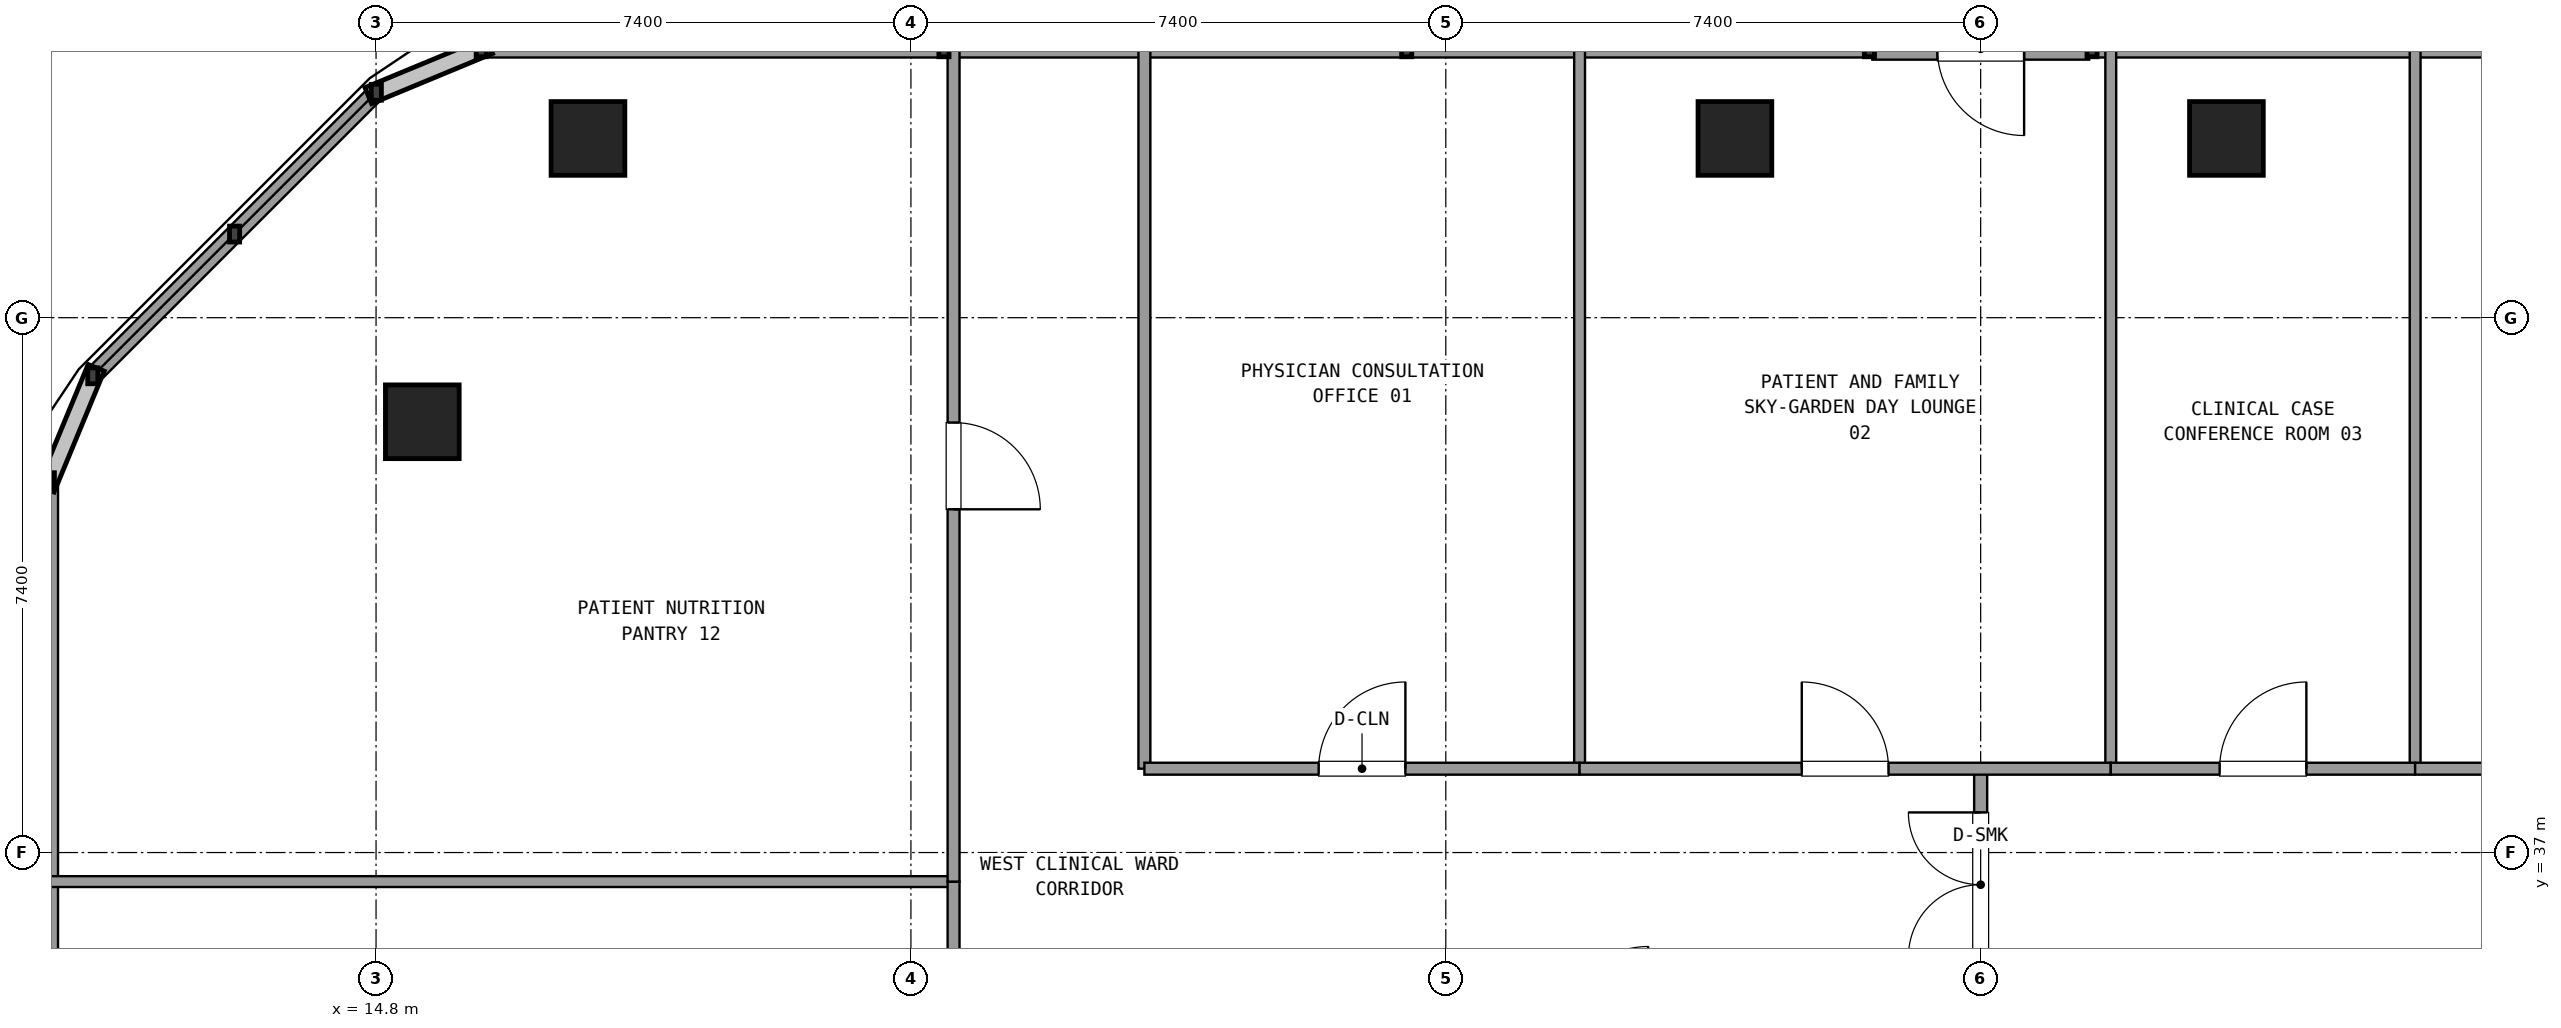
"""IFC4 building model, lengths in metres.
Left out: names, types, materials, properties, quantities, classifications, styles, units other than length and angle.
Written with IfcOpenShell. Run it as: python <this file> out.ifc"""

import sys

from ifc_helpers import new_model, si_unit, direction, frame, frame_2d, origin, origin_2d, place, context, subcontext, project, spatial, rectangle, extrude, element, fill, save


model = new_model("IFC4")
c1 = context("Model", 3, precision=1e-05, world=origin(), true_north=direction((0.0, 1.0)))
c2 = subcontext(c1, "Body", "Model", "MODEL_VIEW")
j1 = project(units=[si_unit("LENGTHUNIT", "METRE"), si_unit("PLANEANGLEUNIT", "RADIAN")], contexts=[c1])
p1 = place(None, origin())
s1 = spatial("IfcSite", under=j1, at=p1, CompositionType="ELEMENT")
p2 = place(p1, origin())
s2 = spatial("IfcBuilding", under=s1, at=p2, CompositionType="ELEMENT")
p3 = place(p2, frame((0.0, 0.0, 81.18)))
s3 = spatial("IfcBuildingStorey", under=s2, at=p3, CompositionType="ELEMENT", Elevation=81.18)
for number, where, z_axis, x_axis in (
    (1, (40.4, 46.88, 0.0), (0.0, 0.0, 1.0), (1.0, 0.0, 0.0)),
    (2, (33.6, 46.88, 0.0), (0.0, 0.0, 1.0), (1.0, 0.0, 0.0)),
    (3, (17.732, 46.88, 0.0), (0.0, 0.0, 1.0), (1.0, 0.0, 0.0)),
    (4, (15.44, 42.96, 0.0), (0.0, 0.0, 1.0), (1.0, 0.0, 0.0)),
):
    element("IfcColumn", number, at=place(p3, frame(where, z_axis=z_axis, x_axis=x_axis)), inside=s3, PredefinedType="COLUMN", context=c2, shape_type="SweptSolid", body=[
        extrude(rectangle(XDim=1.02, YDim=1.02, at=origin_2d()), origin(), (0.0, 0.0, 1.0), 3.6),
    ])
p4 = place(p3, frame((38.501, 48.12, 0.0), z_axis=(0.0, 0.0, 1.0), x_axis=(-1.0, 0.0, 0.0)))
e5 = element("IfcWall", 5, at=p4, inside=s3, PredefinedType="SOLIDWALL", context=c2, shape_type="SweptSolid", body=[
    extrude(rectangle(XDim=3.0, YDim=0.3, at=frame_2d((1.5, 0.0))), origin(), (0.0, 0.0, 1.0), 2.67),
])
p5 = place(p4, frame((0.9, 0.0, 0.0)))
e6 = element("IfcOpeningElement", 6, at=p5, cuts=e5, PredefinedType="OPENING", context=c2, shape_type="SweptSolid", body=[
    extrude(rectangle(XDim=1.2, YDim=2.2, at=frame_2d((0.6, 1.1))), frame((0.0, 0.16, 0.0), z_axis=(0.0, -1.0, 0.0), x_axis=(1.0, 0.0, 0.0)), (0.0, 0.0, 1.0), 0.32),
])
p6 = place(p3, frame((57.745, 48.12, 0.0), z_axis=(0.0, 0.0, 1.0), x_axis=(-1.0, 0.0, 0.0)))
e7 = element("IfcWall", 7, at=p6, inside=s3, PredefinedType="SOLIDWALL", context=c2, shape_type="SweptSolid", body=[
    extrude(rectangle(XDim=19.204, YDim=0.24, at=frame_2d((9.602, 0.0))), origin(), (0.0, 0.0, 1.0), 0.85),
])
p7 = place(p3, frame((35.461, 48.12, 0.0), z_axis=(0.0, 0.0, 1.0), x_axis=(-1.0, 0.0, 0.0)))
e8 = element("IfcWall", 8, at=p7, inside=s3, PredefinedType="SOLIDWALL", context=c2, shape_type="SweptSolid", body=[
    extrude(rectangle(XDim=19.206, YDim=0.24, at=frame_2d((9.603, 0.0))), origin(), (0.0, 0.0, 1.0), 0.85),
])
p8 = place(p3, frame((14.804, 47.519, 0.0), z_axis=(0.0, 0.0, 1.0), x_axis=(-0.707084777957, -0.707128783731, 0.0)))
e9 = element("IfcWall", 9, at=p8, inside=s3, PredefinedType="SOLIDWALL", context=c2, shape_type="SweptSolid", body=[
    extrude(rectangle(XDim=5.548, YDim=0.24, at=frame_2d((2.774, 0.0))), origin(), (0.0, 0.0, 1.0), 0.85),
])
p9 = place(p3, frame((10.28, 42.145, 0.0), z_axis=(0.0, 0.0, 1.0), x_axis=(0.0, -1.0, 0.0)))
e10 = element("IfcWall", 10, at=p9, inside=s3, PredefinedType="SOLIDWALL", context=c2, shape_type="SweptSolid", body=[
    extrude(rectangle(XDim=32.49, YDim=0.24, at=frame_2d((16.245, 0.0))), origin(), (0.0, 0.0, 1.0), 0.85),
])
p10 = place(p3, frame((37.0, 34.95, 0.0), z_axis=(0.0, 0.0, 1.0), x_axis=(0.0, 1.0, 0.0)))
e11 = element("IfcWall", 11, at=p10, inside=s3, PredefinedType="PARTITIONING", context=c2, shape_type="SweptSolid", body=[
    extrude(rectangle(XDim=3.21, YDim=0.18, at=frame_2d((1.605, 0.0))), origin(), (0.0, 0.0, 1.0), 2.61),
])
p11 = place(p10, frame((0.605, 0.0, 0.0)))
e12 = element("IfcOpeningElement", 12, at=p11, cuts=e11, PredefinedType="OPENING", context=c2, shape_type="SweptSolid", body=[
    extrude(rectangle(XDim=2.0, YDim=2.2, at=frame_2d((1.0, 1.1))), frame((0.0, 0.1, 0.0), z_axis=(0.0, -1.0, 0.0), x_axis=(1.0, 0.0, 0.0)), (0.0, 0.0, 1.0), 0.2),
])
p12 = place(p3, frame((25.43, 38.16, 0.0), z_axis=(0.0, 0.0, 1.0), x_axis=(0.0, 1.0, 0.0)))
e13 = element("IfcWall", 13, at=p12, inside=s3, PredefinedType="PARTITIONING", context=c2, shape_type="SweptSolid", body=[
    extrude(rectangle(XDim=9.94, YDim=0.165, at=frame_2d((4.97, 0.0))), origin(), (0.0, 0.0, 1.0), 2.61),
])
p13 = place(p3, frame((31.451, 38.16, 0.0), z_axis=(0.0, 0.0, 1.0), x_axis=(0.0, 1.0, 0.0)))
e14 = element("IfcWall", 14, at=p13, inside=s3, PredefinedType="PARTITIONING", context=c2, shape_type="SweptSolid", body=[
    extrude(rectangle(XDim=9.94, YDim=0.15, at=frame_2d((4.97, 0.0))), origin(), (0.0, 0.0, 1.0), 2.61),
])
p14 = place(p3, frame((25.43, 38.16, 0.0), z_axis=(0.0, 0.0, 1.0), x_axis=(1.0, 0.0, 0.0)))
e15 = element("IfcWall", 15, at=p14, inside=s3, PredefinedType="PARTITIONING", context=c2, shape_type="SweptSolid", body=[
    extrude(rectangle(XDim=6.021, YDim=0.165, at=frame_2d((3.01, 0.0))), origin(), (0.0, 0.0, 1.0), 2.61),
])
p15 = place(p14, frame((2.411, 0.0, 0.0)))
e16 = element("IfcOpeningElement", 16, at=p15, cuts=e15, PredefinedType="OPENING", context=c2, shape_type="SweptSolid", body=[
    extrude(rectangle(XDim=1.2, YDim=2.15, at=frame_2d((0.6, 1.075))), frame((0.0, 0.093, 0.0), z_axis=(0.0, -1.0, 0.0), x_axis=(1.0, 0.0, 0.0)), (0.0, 0.0, 1.0), 0.185),
])
p16 = place(p3, frame((38.8, 38.16, 0.0), z_axis=(0.0, 0.0, 1.0), x_axis=(0.0, 1.0, 0.0)))
e17 = element("IfcWall", 17, at=p16, inside=s3, PredefinedType="PARTITIONING", context=c2, shape_type="SweptSolid", body=[
    extrude(rectangle(XDim=9.94, YDim=0.15, at=frame_2d((4.97, 0.0))), origin(), (0.0, 0.0, 1.0), 2.61),
])
p17 = place(p3, frame((31.451, 38.16, 0.0), z_axis=(0.0, 0.0, 1.0), x_axis=(1.0, 0.0, 0.0)))
e18 = element("IfcWall", 18, at=p17, inside=s3, PredefinedType="PARTITIONING", context=c2, shape_type="SweptSolid", body=[
    extrude(rectangle(XDim=7.349, YDim=0.165, at=frame_2d((3.675, 0.0))), origin(), (0.0, 0.0, 1.0), 2.61),
])
p18 = place(p17, frame((3.074, 0.0, 0.0)))
e19 = element("IfcOpeningElement", 19, at=p18, cuts=e18, PredefinedType="OPENING", context=c2, shape_type="SweptSolid", body=[
    extrude(rectangle(XDim=1.2, YDim=2.15, at=frame_2d((0.6, 1.075))), frame((0.0, 0.093, 0.0), z_axis=(0.0, -1.0, 0.0), x_axis=(1.0, 0.0, 0.0)), (0.0, 0.0, 1.0), 0.185),
])
p19 = place(p3, frame((43.011, 38.16, 0.0), z_axis=(0.0, 0.0, 1.0), x_axis=(0.0, 1.0, 0.0)))
e20 = element("IfcWall", 20, at=p19, inside=s3, PredefinedType="PARTITIONING", context=c2, shape_type="SweptSolid", body=[
    extrude(rectangle(XDim=9.94, YDim=0.15, at=frame_2d((4.97, 0.0))), origin(), (0.0, 0.0, 1.0), 2.61),
])
p20 = place(p3, frame((38.8, 38.16, 0.0), z_axis=(0.0, 0.0, 1.0), x_axis=(1.0, 0.0, 0.0)))
e21 = element("IfcWall", 21, at=p20, inside=s3, PredefinedType="PARTITIONING", context=c2, shape_type="SweptSolid", body=[
    extrude(rectangle(XDim=4.211, YDim=0.165, at=frame_2d((2.105, 0.0))), origin(), (0.0, 0.0, 1.0), 2.61),
])
p21 = place(p20, frame((1.506, 0.0, 0.0)))
e22 = element("IfcOpeningElement", 22, at=p21, cuts=e21, PredefinedType="OPENING", context=c2, shape_type="SweptSolid", body=[
    extrude(rectangle(XDim=1.2, YDim=2.15, at=frame_2d((0.6, 1.075))), frame((0.0, 0.093, 0.0), z_axis=(0.0, -1.0, 0.0), x_axis=(1.0, 0.0, 0.0)), (0.0, 0.0, 1.0), 0.185),
])
p22 = place(p3, frame((43.011, 38.16, 0.0), z_axis=(0.0, 0.0, 1.0), x_axis=(1.0, 0.0, 0.0)))
e23 = element("IfcWall", 23, at=p22, inside=s3, PredefinedType="PARTITIONING", context=c2, shape_type="SweptSolid", body=[
    extrude(rectangle(XDim=5.559, YDim=0.165, at=frame_2d((2.78, 0.0))), origin(), (0.0, 0.0, 1.0), 2.61),
])
p23 = place(p22, frame((2.179, 0.0, 0.0)))
e24 = element("IfcOpeningElement", 24, at=p23, cuts=e23, PredefinedType="OPENING", context=c2, shape_type="SweptSolid", body=[
    extrude(rectangle(XDim=1.2, YDim=2.15, at=frame_2d((0.6, 1.075))), frame((0.0, 0.093, 0.0), z_axis=(0.0, -1.0, 0.0), x_axis=(1.0, 0.0, 0.0)), (0.0, 0.0, 1.0), 0.185),
])
p24 = place(p3, frame((22.79, 36.598, 0.0), z_axis=(0.0, 0.0, 1.0), x_axis=(-1.0, 0.0, 0.0)))
e25 = element("IfcWall", 25, at=p24, inside=s3, PredefinedType="PARTITIONING", context=c2, shape_type="SweptSolid", body=[
    extrude(rectangle(XDim=12.49, YDim=0.15, at=frame_2d((6.245, 0.0))), origin(), (0.0, 0.0, 1.0), 2.61),
])
p25 = place(p3, frame((22.79, 27.56, 0.0), z_axis=(0.0, 0.0, 1.0), x_axis=(0.0, 1.0, 0.0)))
e26 = element("IfcWall", 26, at=p25, inside=s3, PredefinedType="PARTITIONING", context=c2, shape_type="SweptSolid", body=[
    extrude(rectangle(XDim=9.038, YDim=0.165, at=frame_2d((4.519, 0.0))), origin(), (0.0, 0.0, 1.0), 2.61),
])
p26 = place(p25, frame((3.919, 0.0, 0.0)))
e27 = element("IfcOpeningElement", 27, at=p26, cuts=e26, PredefinedType="OPENING", context=c2, shape_type="SweptSolid", body=[
    extrude(rectangle(XDim=1.2, YDim=2.15, at=frame_2d((0.6, 1.075))), frame((0.0, 0.093, 0.0), z_axis=(0.0, -1.0, 0.0), x_axis=(1.0, 0.0, 0.0)), (0.0, 0.0, 1.0), 0.185),
])
p27 = place(p3, frame((22.79, 36.598, 0.0), z_axis=(0.0, 0.0, 1.0), x_axis=(0.0, 1.0, 0.0)))
e28 = element("IfcWall", 28, at=p27, inside=s3, PredefinedType="PARTITIONING", context=c2, shape_type="SweptSolid", body=[
    extrude(rectangle(XDim=11.502, YDim=0.165, at=frame_2d((5.751, 0.0))), origin(), (0.0, 0.0, 1.0), 2.61),
])
p28 = place(p27, frame((5.151, 0.0, 0.0)))
e29 = element("IfcOpeningElement", 29, at=p28, cuts=e28, PredefinedType="OPENING", context=c2, shape_type="SweptSolid", body=[
    extrude(rectangle(XDim=1.2, YDim=2.15, at=frame_2d((0.6, 1.075))), frame((0.0, 0.093, 0.0), z_axis=(0.0, -1.0, 0.0), x_axis=(1.0, 0.0, 0.0)), (0.0, 0.0, 1.0), 0.185),
])
p29 = place(p11, origin())
e30 = element("IfcDoor", 30, at=p29, inside=s3, OperationType="DOUBLE_DOOR_SINGLE_SWING", PredefinedType="DOOR", context=c2, shape_type="SweptSolid", body=[
    extrude(rectangle(XDim=2.0, YDim=2.2, at=frame_2d((1.0, 1.1))), frame((0.0, 0.025, 0.0), z_axis=(0.0, -1.0, 0.0), x_axis=(1.0, 0.0, 0.0)), (0.0, 0.0, 1.0), 0.05),
])
fill(e12, e30)
p30 = place(p15, origin())
e31 = element("IfcDoor", 31, at=p30, inside=s3, OperationType="SINGLE_SWING_RIGHT", PredefinedType="DOOR", context=c2, shape_type="SweptSolid", body=[
    extrude(rectangle(XDim=1.2, YDim=2.15, at=frame_2d((0.6, 1.075))), frame((0.0, 0.025, 0.0), z_axis=(0.0, -1.0, 0.0), x_axis=(1.0, 0.0, 0.0)), (0.0, 0.0, 1.0), 0.05),
])
fill(e16, e31)
p31 = place(p18, origin())
e32 = element("IfcDoor", 32, at=p31, inside=s3, OperationType="SINGLE_SWING_LEFT", PredefinedType="DOOR", context=c2, shape_type="SweptSolid", body=[
    extrude(rectangle(XDim=1.2, YDim=2.15, at=frame_2d((0.6, 1.075))), frame((0.0, 0.025, 0.0), z_axis=(0.0, -1.0, 0.0), x_axis=(1.0, 0.0, 0.0)), (0.0, 0.0, 1.0), 0.05),
])
fill(e19, e32)
p32 = place(p21, origin())
e33 = element("IfcDoor", 33, at=p32, inside=s3, OperationType="SINGLE_SWING_RIGHT", PredefinedType="DOOR", context=c2, shape_type="SweptSolid", body=[
    extrude(rectangle(XDim=1.2, YDim=2.15, at=frame_2d((0.6, 1.075))), frame((0.0, 0.025, 0.0), z_axis=(0.0, -1.0, 0.0), x_axis=(1.0, 0.0, 0.0)), (0.0, 0.0, 1.0), 0.05),
])
fill(e22, e33)
p33 = place(p28, frame((1.2, 0.0, 0.0), z_axis=(0.0, 0.0, 1.0), x_axis=(-1.0, 0.0, 0.0)))
e34 = element("IfcDoor", 34, at=p33, inside=s3, OperationType="SINGLE_SWING_LEFT", PredefinedType="DOOR", context=c2, shape_type="SweptSolid", body=[
    extrude(rectangle(XDim=1.2, YDim=2.15, at=frame_2d((0.6, 1.075))), frame((0.0, 0.025, 0.0), z_axis=(0.0, -1.0, 0.0), x_axis=(1.0, 0.0, 0.0)), (0.0, 0.0, 1.0), 0.05),
])
fill(e29, e34)
save(model, sys.argv[1])
